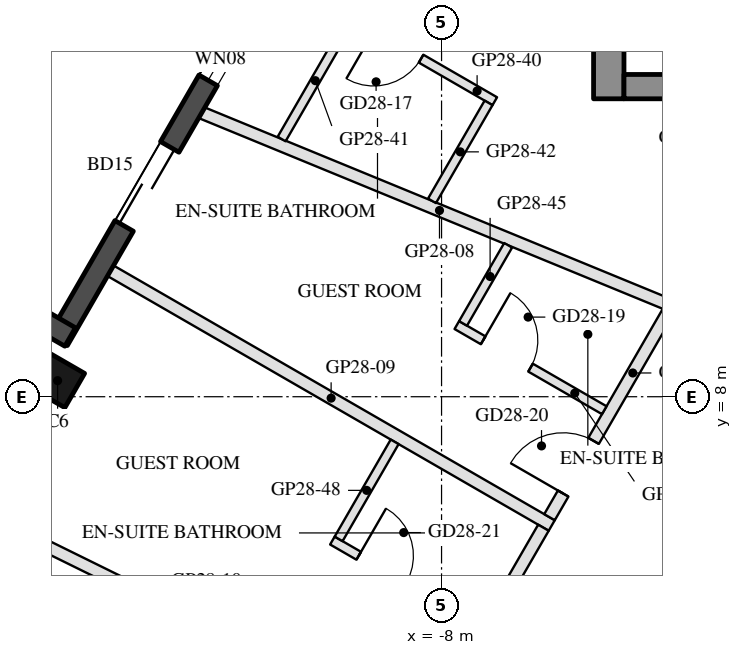
"""IFC4 building model, lengths in metres.
Left out: names, types, materials, properties, quantities, classifications, styles, units other than length and angle.
Written with IfcOpenShell. Run it as: python <this file> out.ifc"""

import sys

from ifc_helpers import new_model, si_unit, direction, frame, frame_2d, origin, origin_2d, place, context, subcontext, project, spatial, rectangle, hollow_rectangle, extrude, boolean, halfspace, element, fill, save


model = new_model("IFC4")
c1 = context("Model", 3, precision=1e-05, world=origin(), true_north=direction((0.0, 1.0)))
c2 = subcontext(c1, "Body", "Model", "MODEL_VIEW")
j1 = project(units=[si_unit("LENGTHUNIT", "METRE"), si_unit("PLANEANGLEUNIT", "RADIAN")], contexts=[c1])
p1 = place(None, origin())
s1 = spatial("IfcSite", under=j1, at=p1, CompositionType="ELEMENT")
p2 = place(p1, origin())
s2 = spatial("IfcBuilding", under=s1, at=p2, CompositionType="ELEMENT")
p3 = place(p2, frame((0.0, 0.0, 283.7)))
s3 = spatial("IfcBuildingStorey", under=s2, at=p3, CompositionType="ELEMENT", Elevation=283.7)
p4 = place(p3, frame((-14.314, 8.264, 0.0), z_axis=(0.0, 0.0, 1.0), x_axis=(0.5, 0.866025403784, 0.0)))
e1 = element("IfcColumn", 1, at=p4, inside=s3, PredefinedType="COLUMN", context=c2, shape_type="SweptSolid", body=[
    boolean("DIFFERENCE", extrude(hollow_rectangle(XDim=0.65, YDim=0.65, WallThickness=0.03, at=origin_2d()), origin(), (0.0, 0.0, 1.0), 3.7), halfspace(frame((0.0, 0.0, 3.663), z_axis=(0.0, 0.0, 1.0), x_axis=(1.0, 0.0, 0.0)), False)),
])
p5 = place(p3, frame((-11.278, 14.173, 0.0), z_axis=(0.0, 0.0, 1.0), x_axis=(-0.499985371027, -0.866033849661, 0.0)))
e2 = element("IfcWall", 2, at=p5, inside=s3, PredefinedType="SOLIDWALL", context=c2, shape_type="SweptSolid", body=[
    extrude(rectangle(XDim=6.055, YDim=0.35, at=frame_2d((3.028, 0.0))), origin(), (0.0, 0.0, 1.0), 3.55),
])
p6 = place(p5, frame((0.32, 0.0, 0.3)))
e3 = element("IfcOpeningElement", 3, at=p6, cuts=e2, PredefinedType="OPENING", context=c2, shape_type="SweptSolid", body=[
    extrude(rectangle(XDim=0.8, YDim=2.65, at=frame_2d((0.4, 1.325))), frame((0.0, 0.185, 0.0), z_axis=(0.0, -1.0, 0.0), x_axis=(1.0, 0.0, 0.0)), (0.0, 0.0, 1.0), 0.37),
])
p7 = place(p5, frame((2.384, 0.0, 0.0)))
e4 = element("IfcOpeningElement", 4, at=p7, cuts=e2, PredefinedType="OPENING", context=c2, shape_type="SweptSolid", body=[
    extrude(rectangle(XDim=1.5, YDim=2.4, at=frame_2d((0.75, 1.2))), frame((0.0, 0.185, 0.0), z_axis=(0.0, -1.0, 0.0), x_axis=(1.0, 0.0, 0.0)), (0.0, 0.0, 1.0), 0.37),
])
p8 = place(p3, frame((-14.108, 8.982, 0.0), z_axis=(0.0, 0.0, 1.0), x_axis=(-0.866005645448, 0.500034220881, 0.0)))
e5 = element("IfcWall", 5, at=p8, inside=s3, PredefinedType="SOLIDWALL", context=c2, shape_type="SweptSolid", body=[
    extrude(rectangle(XDim=1.22, YDim=0.35, at=frame_2d((0.61, 0.0))), origin(), (0.0, 0.0, 1.0), 3.55),
])
p9 = place(p3, frame((-5.25, 12.9, 0.0), z_axis=(0.0, 0.0, 1.0), x_axis=(0.0, 1.0, 0.0)))
e6 = element("IfcWall", 6, at=p9, inside=s3, PredefinedType="SHEAR", context=c2, shape_type="SweptSolid", body=[
    extrude(rectangle(XDim=12.129, YDim=0.5, at=frame_2d((6.064, 0.0))), origin(), (0.0, 0.0, 1.0), 3.5),
])
p10 = place(p3, frame((5.0, 13.1, 0.0), z_axis=(0.0, 0.0, 1.0), x_axis=(-1.0, 0.0, 0.0)))
e7 = element("IfcWall", 7, at=p10, inside=s3, PredefinedType="SHEAR", context=c2, shape_type="SweptSolid", body=[
    extrude(rectangle(XDim=10.0, YDim=0.4, at=frame_2d((5.0, 0.0))), origin(), (0.0, 0.0, 1.0), 3.5),
])
p11 = place(p10, frame((3.55, 0.0, 0.0)))
e8 = element("IfcOpeningElement", 8, at=p11, cuts=e7, PredefinedType="OPENING", context=c2, shape_type="SweptSolid", body=[
    extrude(rectangle(XDim=1.1, YDim=2.1, at=frame_2d((0.55, 1.05))), frame((0.0, 0.21, 0.0), z_axis=(0.0, -1.0, 0.0), x_axis=(1.0, 0.0, 0.0)), (0.0, 0.0, 1.0), 0.42),
])
p12 = place(p10, frame((5.85, 0.0, 0.0)))
e9 = element("IfcOpeningElement", 9, at=p12, cuts=e7, PredefinedType="OPENING", context=c2, shape_type="SweptSolid", body=[
    extrude(rectangle(XDim=1.4, YDim=2.1, at=frame_2d((0.7, 1.05))), frame((0.0, 0.21, 0.0), z_axis=(0.0, -1.0, 0.0), x_axis=(1.0, 0.0, 0.0)), (0.0, 0.0, 1.0), 0.42),
])
p13 = place(p3, frame((-11.944, 12.67, 0.0), z_axis=(0.0, 0.0, 1.0), x_axis=(0.924897439871, -0.380216682591, 0.0)))
e10 = element("IfcWall", 10, at=p13, inside=s3, PredefinedType="PARTITIONING", context=c2, shape_type="SweptSolid", body=[
    extrude(rectangle(XDim=8.454, YDim=0.2, at=frame_2d((4.227, 0.0))), origin(), (0.0, 0.0, 1.0), 3.1),
])
p14 = place(p3, frame((-13.444, 10.071, 0.0), z_axis=(0.0, 0.0, 1.0), x_axis=(0.866030795796, -0.499990660646, 0.0)))
e11 = element("IfcWall", 11, at=p14, inside=s3, PredefinedType="PARTITIONING", context=c2, shape_type="SweptSolid", body=[
    extrude(rectangle(XDim=8.379, YDim=0.2, at=frame_2d((4.189, 0.0))), origin(), (0.0, 0.0, 1.0), 3.1),
])
p15 = place(p3, frame((-16.524, 6.538, 0.0), z_axis=(0.0, 0.0, 1.0), x_axis=(0.897120251728, -0.441786434762, 0.0)))
e12 = element("IfcWall", 12, at=p15, inside=s3, PredefinedType="PARTITIONING", context=c2, shape_type="SweptSolid", body=[
    extrude(rectangle(XDim=9.299, YDim=0.2, at=frame_2d((4.649, 0.0))), origin(), (0.0, 0.0, 1.0), 3.1),
])
p16 = place(p3, frame((-7.125, 12.86, 0.0), z_axis=(0.0, 0.0, 1.0), x_axis=(-0.866034573852, 0.49998411664, 0.0)))
e13 = element("IfcWall", 13, at=p16, inside=s3, PredefinedType="PARTITIONING", context=c2, shape_type="SweptSolid", body=[
    extrude(rectangle(XDim=2.8, YDim=0.15, at=frame_2d((1.4, 0.0))), origin(), (0.0, 0.0, 1.0), 3.55),
])
p17 = place(p16, frame((1.4, 0.0, 0.0)))
e14 = element("IfcOpeningElement", 14, at=p17, cuts=e13, PredefinedType="OPENING", context=c2, shape_type="SweptSolid", body=[
    extrude(rectangle(XDim=0.9, YDim=2.1, at=frame_2d((0.45, 1.05))), frame((0.0, 0.085, 0.0), z_axis=(0.0, -1.0, 0.0), x_axis=(1.0, 0.0, 0.0)), (0.0, 0.0, 1.0), 0.17),
])
p18 = place(p3, frame((-9.522, 14.158, 0.0), z_axis=(0.0, 0.0, 1.0), x_axis=(-0.49990681678, -0.866079196458, 0.0)))
e15 = element("IfcWall", 15, at=p18, inside=s3, PredefinedType="PARTITIONING", context=c2, shape_type="SweptSolid", body=[
    extrude(rectangle(XDim=2.216, YDim=0.15, at=frame_2d((1.108, 0.0))), origin(), (0.0, 0.0, 1.0), 3.05),
])
p19 = place(p3, frame((-7.227, 12.833, 0.0), z_axis=(0.0, 0.0, 1.0), x_axis=(-0.500063286585, -0.865988862174, 0.0)))
e16 = element("IfcWall", 16, at=p19, inside=s3, PredefinedType="PARTITIONING", context=c2, shape_type="SweptSolid", body=[
    extrude(rectangle(XDim=1.86, YDim=0.15, at=frame_2d((0.93, 0.0))), origin(), (0.0, 0.0, 1.0), 3.05),
])
p20 = place(p3, frame((-6.225, 6.019, 0.0), z_axis=(0.0, 0.0, 1.0), x_axis=(0.500024943202, 0.866011002341, 0.0)))
e17 = element("IfcWall", 17, at=p20, inside=s3, PredefinedType="PARTITIONING", context=c2, shape_type="SweptSolid", body=[
    extrude(rectangle(XDim=3.912, YDim=0.2, at=frame_2d((1.956, 0.0))), origin(), (0.0, 0.0, 1.0), 3.05),
])
p21 = place(p20, frame((0.449, 0.0, 0.0)))
e18 = element("IfcOpeningElement", 18, at=p21, cuts=e17, PredefinedType="OPENING", context=c2, shape_type="SweptSolid", body=[
    extrude(rectangle(XDim=1.0, YDim=2.1, at=frame_2d((0.5, 1.05))), frame((0.0, 0.11, 0.0), z_axis=(0.0, -1.0, 0.0), x_axis=(1.0, 0.0, 0.0)), (0.0, 0.0, 1.0), 0.22),
])
p22 = place(p3, frame((-7.749, 9.178, 0.0), z_axis=(0.0, 0.0, 1.0), x_axis=(0.866034573852, -0.49998411664, 0.0)))
e19 = element("IfcWall", 19, at=p22, inside=s3, PredefinedType="PARTITIONING", context=c2, shape_type="SweptSolid", body=[
    extrude(rectangle(XDim=2.8, YDim=0.15, at=frame_2d((1.4, 0.0))), origin(), (0.0, 0.0, 1.0), 3.55),
])
p23 = place(p22, frame((0.5, 0.0, 0.0)))
e20 = element("IfcOpeningElement", 20, at=p23, cuts=e19, PredefinedType="OPENING", context=c2, shape_type="SweptSolid", body=[
    extrude(rectangle(XDim=0.9, YDim=2.1, at=frame_2d((0.45, 1.05))), frame((0.0, 0.085, 0.0), z_axis=(0.0, -1.0, 0.0), x_axis=(1.0, 0.0, 0.0)), (0.0, 0.0, 1.0), 0.17),
])
p24 = place(p3, frame((-6.905, 10.491, 0.0), z_axis=(0.0, 0.0, 1.0), x_axis=(-0.499926630096, -0.866067759775, 0.0)))
e21 = element("IfcWall", 21, at=p24, inside=s3, PredefinedType="PARTITIONING", context=c2, shape_type="SweptSolid", body=[
    extrude(rectangle(XDim=1.484, YDim=0.15, at=frame_2d((0.742, 0.0))), origin(), (0.0, 0.0, 1.0), 3.55),
])
p25 = place(p3, frame((-8.221, 2.561, 0.0), z_axis=(0.0, 0.0, 1.0), x_axis=(0.499988034227, 0.866032312117, 0.0)))
e22 = element("IfcWall", 22, at=p25, inside=s3, PredefinedType="PARTITIONING", context=c2, shape_type="SweptSolid", body=[
    extrude(rectangle(XDim=3.793, YDim=0.2, at=frame_2d((1.896, 0.0))), origin(), (0.0, 0.0, 1.0), 3.05),
])
p26 = place(p25, frame((0.4, 0.0, 0.0)))
e23 = element("IfcOpeningElement", 23, at=p26, cuts=e22, PredefinedType="OPENING", context=c2, shape_type="SweptSolid", body=[
    extrude(rectangle(XDim=1.0, YDim=2.1, at=frame_2d((0.5, 1.05))), frame((0.0, 0.11, 0.0), z_axis=(0.0, -1.0, 0.0), x_axis=(1.0, 0.0, 0.0)), (0.0, 0.0, 1.0), 0.22),
])
p27 = place(p3, frame((-9.795, 5.634, 0.0), z_axis=(0.0, 0.0, 1.0), x_axis=(0.866034573852, -0.49998411664, 0.0)))
e24 = element("IfcWall", 24, at=p27, inside=s3, PredefinedType="PARTITIONING", context=c2, shape_type="SweptSolid", body=[
    extrude(rectangle(XDim=2.8, YDim=0.15, at=frame_2d((1.4, 0.0))), origin(), (0.0, 0.0, 1.0), 3.05),
])
p28 = place(p27, frame((0.5, 0.0, 0.0)))
e25 = element("IfcOpeningElement", 25, at=p28, cuts=e24, PredefinedType="OPENING", context=c2, shape_type="SweptSolid", body=[
    extrude(rectangle(XDim=0.9, YDim=2.1, at=frame_2d((0.45, 1.05))), frame((0.0, 0.085, 0.0), z_axis=(0.0, -1.0, 0.0), x_axis=(1.0, 0.0, 0.0)), (0.0, 0.0, 1.0), 0.17),
])
p29 = place(p3, frame((-8.771, 7.258, 0.0), z_axis=(0.0, 0.0, 1.0), x_axis=(-0.50002820729, -0.866009117685, 0.0)))
e26 = element("IfcWall", 26, at=p29, inside=s3, PredefinedType="PARTITIONING", context=c2, shape_type="SweptSolid", body=[
    extrude(rectangle(XDim=1.843, YDim=0.15, at=frame_2d((0.922, 0.0))), origin(), (0.0, 0.0, 1.0), 3.05),
])
p30 = place(p3, frame((-17.246, 5.286, 0.0), z_axis=(0.0, 0.0, 1.0), x_axis=(0.865746766399, -0.500482303853, 0.0)))
e27 = element("IfcWall", 27, at=p30, inside=s3, PredefinedType="PARTITIONING", context=c2, shape_type="SweptSolid", body=[
    extrude(rectangle(XDim=9.279, YDim=0.15, at=frame_2d((4.639, 0.0))), origin(), (0.0, 0.0, 1.0), 3.1),
])
p31 = place(p6, origin())
e28 = element("IfcWindow", 28, at=p31, inside=s3, PartitioningType="SINGLE_PANEL", PredefinedType="WINDOW", context=c2, shape_type="SweptSolid", body=[
    extrude(rectangle(XDim=0.8, YDim=2.65, at=frame_2d((0.4, 1.325))), frame((0.0, 0.03, 0.0), z_axis=(0.0, -1.0, 0.0), x_axis=(1.0, 0.0, 0.0)), (0.0, 0.0, 1.0), 0.06),
])
fill(e3, e28)
p32 = place(p7, frame((1.5, 0.0, 0.0), z_axis=(0.0, 0.0, 1.0), x_axis=(-1.0, 0.0, 0.0)))
e29 = element("IfcDoor", 29, at=p32, inside=s3, OperationType="SLIDING_TO_LEFT", PredefinedType="DOOR", context=c2, shape_type="SweptSolid", body=[
    extrude(rectangle(XDim=1.5, YDim=2.4, at=frame_2d((0.75, 1.2))), frame((0.0, 0.025, 0.0), z_axis=(0.0, -1.0, 0.0), x_axis=(1.0, 0.0, 0.0)), (0.0, 0.0, 1.0), 0.05),
])
fill(e4, e29)
p33 = place(p17, origin())
e30 = element("IfcDoor", 30, at=p33, inside=s3, OperationType="SINGLE_SWING_RIGHT", PredefinedType="DOOR", context=c2, shape_type="SweptSolid", body=[
    extrude(rectangle(XDim=0.9, YDim=2.1, at=frame_2d((0.45, 1.05))), frame((0.0, 0.025, 0.0), z_axis=(0.0, -1.0, 0.0), x_axis=(1.0, 0.0, 0.0)), (0.0, 0.0, 1.0), 0.05),
])
fill(e14, e30)
p34 = place(p23, origin())
e31 = element("IfcDoor", 31, at=p34, inside=s3, OperationType="SINGLE_SWING_LEFT", PredefinedType="DOOR", context=c2, shape_type="SweptSolid", body=[
    extrude(rectangle(XDim=0.9, YDim=2.1, at=frame_2d((0.45, 1.05))), frame((0.0, 0.025, 0.0), z_axis=(0.0, -1.0, 0.0), x_axis=(1.0, 0.0, 0.0)), (0.0, 0.0, 1.0), 0.05),
])
fill(e20, e31)
p35 = place(p21, origin())
e32 = element("IfcDoor", 32, at=p35, inside=s3, OperationType="SINGLE_SWING_LEFT", PredefinedType="DOOR", context=c2, shape_type="SweptSolid", body=[
    extrude(rectangle(XDim=1.0, YDim=2.1, at=frame_2d((0.5, 1.05))), frame((0.0, 0.025, 0.0), z_axis=(0.0, -1.0, 0.0), x_axis=(1.0, 0.0, 0.0)), (0.0, 0.0, 1.0), 0.05),
])
fill(e18, e32)
p36 = place(p28, origin())
e33 = element("IfcDoor", 33, at=p36, inside=s3, OperationType="SINGLE_SWING_LEFT", PredefinedType="DOOR", context=c2, shape_type="SweptSolid", body=[
    extrude(rectangle(XDim=0.9, YDim=2.1, at=frame_2d((0.45, 1.05))), frame((0.0, 0.025, 0.0), z_axis=(0.0, -1.0, 0.0), x_axis=(1.0, 0.0, 0.0)), (0.0, 0.0, 1.0), 0.05),
])
fill(e25, e33)
save(model, sys.argv[1])
